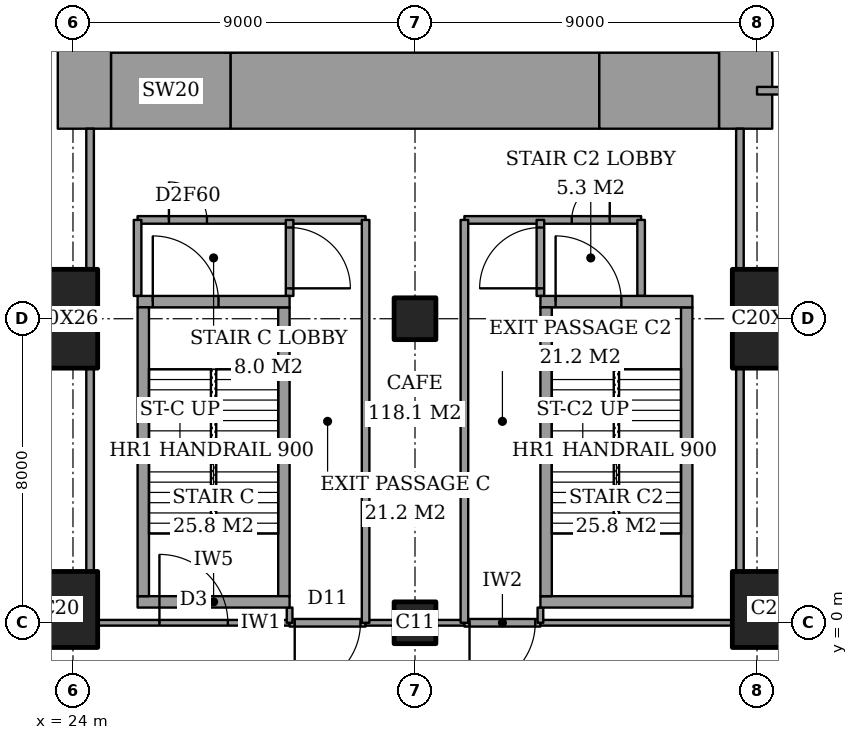
"""IFC4 building model, lengths in metres.
Left out: names, types, materials, properties, quantities, classifications, styles, units other than length and angle.
Written with IfcOpenShell. Run it as: python <this file> out.ifc"""

import sys

from ifc_helpers import new_model, si_unit, direction, frame, frame_2d, origin, origin_2d, place, context, subcontext, project, spatial, rectangle, extrude, element, fill, save


model = new_model("IFC4")
c1 = context("Model", 3, precision=1e-05, world=origin(), true_north=direction((0.0, 1.0)))
c2 = subcontext(c1, "Body", "Model", "MODEL_VIEW")
j1 = project(units=[si_unit("LENGTHUNIT", "METRE"), si_unit("PLANEANGLEUNIT", "RADIAN")], contexts=[c1])
p1 = place(None, origin())
s1 = spatial("IfcSite", under=j1, at=p1, CompositionType="ELEMENT")
p2 = place(p1, origin())
s2 = spatial("IfcBuilding", under=s1, at=p2, CompositionType="ELEMENT")
p3 = place(p2, origin())
s3 = spatial("IfcBuildingStorey", under=s2, at=p3, CompositionType="ELEMENT", Elevation=0.0)
p4 = place(p3, frame((23.65, 0.35, 0.0), z_axis=(0.0, 0.0, 1.0), x_axis=(1.0, 0.0, 0.0)))
e1 = element("IfcColumn", 1, at=p4, inside=s3, PredefinedType="COLUMN", context=c2, shape_type="SweptSolid", body=[
    extrude(rectangle(XDim=2.0, YDim=2.0, at=origin_2d()), origin(), (0.0, 0.0, 1.0), 6.0),
])
p5 = place(p3, frame((23.65, 8.0, 0.0), z_axis=(0.0, 0.0, 1.0), x_axis=(1.0, 0.0, 0.0)))
e2 = element("IfcColumn", 2, at=p5, inside=s3, PredefinedType="COLUMN", context=c2, shape_type="SweptSolid", body=[
    extrude(rectangle(XDim=2.0, YDim=2.6, at=origin_2d()), origin(), (0.0, 0.0, 1.0), 6.0),
])
for number, where, z_axis, x_axis in (
    (3, (33.0, 0.0, 0.0), (0.0, 0.0, 1.0), (1.0, 0.0, 0.0)),
    (4, (33.0, 8.0, 0.0), (0.0, 0.0, 1.0), (1.0, 0.0, 0.0)),
):
    element("IfcColumn", number, at=place(p3, frame(where, z_axis=z_axis, x_axis=x_axis)), inside=s3, PredefinedType="COLUMN", context=c2, shape_type="SweptSolid", body=[
        extrude(rectangle(XDim=1.1, YDim=1.1, at=origin_2d()), origin(), (0.0, 0.0, 1.0), 6.0),
    ])
p6 = place(p3, frame((42.35, 0.35, 0.0), z_axis=(0.0, 0.0, 1.0), x_axis=(1.0, 0.0, 0.0)))
e5 = element("IfcColumn", 5, at=p6, inside=s3, PredefinedType="COLUMN", context=c2, shape_type="SweptSolid", body=[
    extrude(rectangle(XDim=2.0, YDim=2.0, at=origin_2d()), origin(), (0.0, 0.0, 1.0), 6.0),
])
p7 = place(p3, frame((42.35, 8.0, 0.0), z_axis=(0.0, 0.0, 1.0), x_axis=(1.0, 0.0, 0.0)))
e6 = element("IfcColumn", 6, at=p7, inside=s3, PredefinedType="COLUMN", context=c2, shape_type="SweptSolid", body=[
    extrude(rectangle(XDim=2.0, YDim=2.6, at=origin_2d()), origin(), (0.0, 0.0, 1.0), 6.0),
])
p8 = place(p3, frame((25.0, 14.0, 0.0), z_axis=(0.0, 0.0, 1.0), x_axis=(1.0, 0.0, 0.0)))
e7 = element("IfcWall", 7, at=p8, inside=s3, PredefinedType="SHEAR", context=c2, shape_type="SweptSolid", body=[
    extrude(rectangle(XDim=3.15, YDim=2.0, at=frame_2d((1.575, 0.0))), origin(), (0.0, 0.0, 1.0), 6.0),
])
p9 = place(p3, frame((28.15, 14.0, 0.0), z_axis=(0.0, 0.0, 1.0), x_axis=(1.0, 0.0, 0.0)))
e8 = element("IfcWall", 8, at=p9, inside=s3, PredefinedType="SHEAR", context=c2, shape_type="SweptSolid", body=[
    extrude(rectangle(XDim=9.7, YDim=2.0, at=frame_2d((4.85, 0.0))), origin(), (0.0, 0.0, 1.0), 6.0),
])
p10 = place(p3, frame((37.85, 14.0, 0.0), z_axis=(0.0, 0.0, 1.0), x_axis=(1.0, 0.0, 0.0)))
e9 = element("IfcWall", 9, at=p10, inside=s3, PredefinedType="SHEAR", context=c2, shape_type="SweptSolid", body=[
    extrude(rectangle(XDim=3.15, YDim=2.0, at=frame_2d((1.575, 0.0))), origin(), (0.0, 0.0, 1.0), 6.0),
])
p11 = place(p3, frame((24.3, 13.0, 0.0), z_axis=(0.0, 0.0, 1.0), x_axis=(0.0, 1.0, 0.0)))
e10 = element("IfcWall", 10, at=p11, inside=s3, PredefinedType="SHEAR", context=c2, shape_type="SweptSolid", body=[
    extrude(rectangle(XDim=10.15, YDim=1.4, at=frame_2d((5.075, 0.0))), origin(), (0.0, 0.0, 1.0), 6.0),
])
p12 = place(p3, frame((41.7, 13.0, 0.0), z_axis=(0.0, 0.0, 1.0), x_axis=(0.0, 1.0, 0.0)))
e11 = element("IfcWall", 11, at=p12, inside=s3, PredefinedType="SHEAR", context=c2, shape_type="SweptSolid", body=[
    extrude(rectangle(XDim=11.85, YDim=1.4, at=frame_2d((5.925, 0.0))), origin(), (0.0, 0.0, 1.0), 6.0),
])
p13 = place(p12, frame((7.5, 0.0, 0.0)))
e12 = element("IfcOpeningElement", 12, at=p13, cuts=e11, PredefinedType="OPENING", context=c2, shape_type="SweptSolid", body=[
    extrude(rectangle(XDim=1.8, YDim=2.4, at=frame_2d((0.9, 1.2))), frame((0.0, 0.71, 0.0), z_axis=(0.0, -1.0, 0.0), x_axis=(1.0, 0.0, 0.0)), (0.0, 0.0, 1.0), 1.42),
])
p14 = place(p3, frame((29.7, 0.0, 0.0), z_axis=(0.0, 0.0, 1.0), x_axis=(1.0, 0.0, 0.0)))
e13 = element("IfcWall", 13, at=p14, inside=s3, PredefinedType="PARTITIONING", context=c2, shape_type="SweptSolid", body=[
    extrude(rectangle(XDim=2.0, YDim=0.2, at=frame_2d((1.0, 0.0))), origin(), (0.0, 0.0, 1.0), 5.7),
])
p15 = place(p14, frame((1.865, 0.0, 0.0), z_axis=(0.0, 0.0, 1.0), x_axis=(-1.0, 0.0, 0.0)))
e14 = element("IfcOpeningElement", 14, at=p15, cuts=e13, PredefinedType="OPENING", context=c2, shape_type="SweptSolid", body=[
    extrude(rectangle(XDim=1.73, YDim=2.1, at=frame_2d((0.865, 1.05))), frame((0.0, 0.11, 0.0), z_axis=(0.0, -1.0, 0.0), x_axis=(1.0, 0.0, 0.0)), (0.0, 0.0, 1.0), 0.22),
])
p16 = place(p3, frame((34.3, 0.0, 0.0), z_axis=(0.0, 0.0, 1.0), x_axis=(1.0, 0.0, 0.0)))
e15 = element("IfcWall", 15, at=p16, inside=s3, PredefinedType="PARTITIONING", context=c2, shape_type="SweptSolid", body=[
    extrude(rectangle(XDim=2.0, YDim=0.2, at=frame_2d((1.0, 0.0))), origin(), (0.0, 0.0, 1.0), 5.7),
])
p17 = place(p16, frame((1.865, 0.0, 0.0), z_axis=(0.0, 0.0, 1.0), x_axis=(-1.0, 0.0, 0.0)))
e16 = element("IfcOpeningElement", 16, at=p17, cuts=e15, PredefinedType="OPENING", context=c2, shape_type="SweptSolid", body=[
    extrude(rectangle(XDim=1.73, YDim=2.1, at=frame_2d((0.865, 1.05))), frame((0.0, 0.11, 0.0), z_axis=(0.0, -1.0, 0.0), x_axis=(1.0, 0.0, 0.0)), (0.0, 0.0, 1.0), 0.22),
])
p18 = place(p3, frame((24.65, 0.0, 0.0), z_axis=(0.0, 0.0, 1.0), x_axis=(1.0, 0.0, 0.0)))
e17 = element("IfcWall", 17, at=p18, inside=s3, PredefinedType="PARTITIONING", context=c2, shape_type="SweptSolid", body=[
    extrude(rectangle(XDim=5.05, YDim=0.15, at=frame_2d((2.525, 0.0))), origin(), (0.0, 0.0, 1.0), 5.7),
])
p19 = place(p18, frame((1.625, 0.0, 0.0)))
e18 = element("IfcOpeningElement", 18, at=p19, cuts=e17, PredefinedType="OPENING", context=c2, shape_type="SweptSolid", body=[
    extrude(rectangle(XDim=1.8, YDim=2.1, at=frame_2d((0.9, 1.05))), frame((0.0, 0.085, 0.0), z_axis=(0.0, -1.0, 0.0), x_axis=(1.0, 0.0, 0.0)), (0.0, 0.0, 1.0), 0.17),
])
for number, where, z_axis, x_axis in (
    (19, (31.7, 0.0, 0.0), (0.0, 0.0, 1.0), (1.0, 0.0, 0.0)),
    (20, (33.55, 0.0, 0.0), (0.0, 0.0, 1.0), (1.0, 0.0, 0.0)),
):
    element("IfcWall", number, at=place(p3, frame(where, z_axis=z_axis, x_axis=x_axis)), inside=s3, PredefinedType="PARTITIONING", context=c2, shape_type="SweptSolid", body=[
        extrude(rectangle(XDim=0.75, YDim=0.15, at=frame_2d((0.375, 0.0))), origin(), (0.0, 0.0, 1.0), 5.7),
    ])
p20 = place(p3, frame((36.3, 0.0, 0.0), z_axis=(0.0, 0.0, 1.0), x_axis=(1.0, 0.0, 0.0)))
e21 = element("IfcWall", 21, at=p20, inside=s3, PredefinedType="PARTITIONING", context=c2, shape_type="SweptSolid", body=[
    extrude(rectangle(XDim=5.05, YDim=0.15, at=frame_2d((2.525, 0.0))), origin(), (0.0, 0.0, 1.0), 5.7),
])
p21 = place(p3, frame((25.7, 10.6, 0.0), z_axis=(0.0, 0.0, 1.0), x_axis=(1.0, 0.0, 0.0)))
e22 = element("IfcWall", 22, at=p21, inside=s3, PredefinedType="PARTITIONING", context=c2, shape_type="SweptSolid", body=[
    extrude(rectangle(XDim=6.0, YDim=0.2, at=frame_2d((3.0, 0.0))), origin(), (0.0, 0.0, 1.0), 5.7),
])
p22 = place(p21, frame((0.825, 0.0, 0.0)))
e23 = element("IfcOpeningElement", 23, at=p22, cuts=e22, PredefinedType="OPENING", context=c2, shape_type="SweptSolid", body=[
    extrude(rectangle(XDim=1.0, YDim=2.1, at=frame_2d((0.5, 1.05))), frame((0.0, 0.11, 0.0), z_axis=(0.0, -1.0, 0.0), x_axis=(1.0, 0.0, 0.0)), (0.0, 0.0, 1.0), 0.22),
])
p23 = place(p3, frame((34.3, 10.6, 0.0), z_axis=(0.0, 0.0, 1.0), x_axis=(1.0, 0.0, 0.0)))
e24 = element("IfcWall", 24, at=p23, inside=s3, PredefinedType="PARTITIONING", context=c2, shape_type="SweptSolid", body=[
    extrude(rectangle(XDim=4.65, YDim=0.2, at=frame_2d((2.325, 0.0))), origin(), (0.0, 0.0, 1.0), 5.7),
])
p24 = place(p23, frame((2.825, 0.0, 0.0)))
e25 = element("IfcOpeningElement", 25, at=p24, cuts=e24, PredefinedType="OPENING", context=c2, shape_type="SweptSolid", body=[
    extrude(rectangle(XDim=1.0, YDim=2.1, at=frame_2d((0.5, 1.05))), frame((0.0, 0.11, 0.0), z_axis=(0.0, -1.0, 0.0), x_axis=(1.0, 0.0, 0.0)), (0.0, 0.0, 1.0), 0.22),
])
p25 = place(p3, frame((42.0, 14.0, 0.0), z_axis=(0.0, 0.0, 1.0), x_axis=(1.0, 0.0, 0.0)))
e26 = element("IfcWall", 26, at=p25, inside=s3, PredefinedType="PARTITIONING", context=c2, shape_type="SweptSolid", body=[
    extrude(rectangle(XDim=5.1, YDim=0.2, at=frame_2d((2.55, 0.0))), origin(), (0.0, 0.0, 1.0), 5.7),
])
p26 = place(p3, frame((24.45, 1.35, 0.0), z_axis=(0.0, 0.0, 1.0), x_axis=(0.0, 1.0, 0.0)))
e27 = element("IfcWall", 27, at=p26, inside=s3, PredefinedType="PARTITIONING", context=c2, shape_type="SweptSolid", body=[
    extrude(rectangle(XDim=5.35, YDim=0.2, at=frame_2d((2.675, 0.0))), origin(), (0.0, 0.0, 1.0), 5.7),
])
p27 = place(p3, frame((24.45, 9.3, 0.0), z_axis=(0.0, 0.0, 1.0), x_axis=(0.0, 1.0, 0.0)))
e28 = element("IfcWall", 28, at=p27, inside=s3, PredefinedType="PARTITIONING", context=c2, shape_type="SweptSolid", body=[
    extrude(rectangle(XDim=3.7, YDim=0.2, at=frame_2d((1.85, 0.0))), origin(), (0.0, 0.0, 1.0), 5.7),
])
p28 = place(p3, frame((25.7, 8.6, 0.0), z_axis=(0.0, 0.0, 1.0), x_axis=(0.0, 1.0, 0.0)))
e29 = element("IfcWall", 29, at=p28, inside=s3, PredefinedType="PARTITIONING", context=c2, shape_type="SweptSolid", body=[
    extrude(rectangle(XDim=2.0, YDim=0.2, at=frame_2d((1.0, 0.0))), origin(), (0.0, 0.0, 1.0), 5.7),
])
p29 = place(p3, frame((29.7, 8.6, 0.0), z_axis=(0.0, 0.0, 1.0), x_axis=(0.0, 1.0, 0.0)))
e30 = element("IfcWall", 30, at=p29, inside=s3, PredefinedType="PARTITIONING", context=c2, shape_type="SweptSolid", body=[
    extrude(rectangle(XDim=2.0, YDim=0.2, at=frame_2d((1.0, 0.0))), origin(), (0.0, 0.0, 1.0), 5.7),
])
p30 = place(p29, frame((1.8, 0.0, 0.0), z_axis=(0.0, 0.0, 1.0), x_axis=(-1.0, 0.0, 0.0)))
e31 = element("IfcOpeningElement", 31, at=p30, cuts=e30, PredefinedType="OPENING", context=c2, shape_type="SweptSolid", body=[
    extrude(rectangle(XDim=1.6, YDim=2.1, at=frame_2d((0.8, 1.05))), frame((0.0, 0.11, 0.0), z_axis=(0.0, -1.0, 0.0), x_axis=(1.0, 0.0, 0.0)), (0.0, 0.0, 1.0), 0.22),
])
p31 = place(p3, frame((29.7, 0.0, 0.0), z_axis=(0.0, 0.0, 1.0), x_axis=(0.0, 1.0, 0.0)))
e32 = element("IfcWall", 32, at=p31, inside=s3, PredefinedType="PARTITIONING", context=c2, shape_type="SweptSolid", body=[
    extrude(rectangle(XDim=0.4, YDim=0.15, at=frame_2d((0.2, 0.0))), origin(), (0.0, 0.0, 1.0), 5.7),
])
for number, where, z_axis, x_axis in (
    (33, (31.7, 0.0, 0.0), (0.0, 0.0, 1.0), (0.0, 1.0, 0.0)),
    (34, (34.3, 0.0, 0.0), (0.0, 0.0, 1.0), (0.0, 1.0, 0.0)),
):
    element("IfcWall", number, at=place(p3, frame(where, z_axis=z_axis, x_axis=x_axis)), inside=s3, PredefinedType="PARTITIONING", context=c2, shape_type="SweptSolid", body=[
        extrude(rectangle(XDim=10.6, YDim=0.2, at=frame_2d((5.3, 0.0))), origin(), (0.0, 0.0, 1.0), 5.7),
    ])
p32 = place(p3, frame((36.3, 8.6, 0.0), z_axis=(0.0, 0.0, 1.0), x_axis=(0.0, 1.0, 0.0)))
e35 = element("IfcWall", 35, at=p32, inside=s3, PredefinedType="PARTITIONING", context=c2, shape_type="SweptSolid", body=[
    extrude(rectangle(XDim=2.0, YDim=0.2, at=frame_2d((1.0, 0.0))), origin(), (0.0, 0.0, 1.0), 5.7),
])
p33 = place(p32, frame((0.2, 0.0, 0.0)))
e36 = element("IfcOpeningElement", 36, at=p33, cuts=e35, PredefinedType="OPENING", context=c2, shape_type="SweptSolid", body=[
    extrude(rectangle(XDim=1.6, YDim=2.1, at=frame_2d((0.8, 1.05))), frame((0.0, 0.11, 0.0), z_axis=(0.0, -1.0, 0.0), x_axis=(1.0, 0.0, 0.0)), (0.0, 0.0, 1.0), 0.22),
])
p34 = place(p3, frame((36.3, 0.0, 0.0), z_axis=(0.0, 0.0, 1.0), x_axis=(0.0, 1.0, 0.0)))
e37 = element("IfcWall", 37, at=p34, inside=s3, PredefinedType="PARTITIONING", context=c2, shape_type="SweptSolid", body=[
    extrude(rectangle(XDim=0.4, YDim=0.15, at=frame_2d((0.2, 0.0))), origin(), (0.0, 0.0, 1.0), 5.7),
])
p35 = place(p3, frame((38.95, 8.6, 0.0), z_axis=(0.0, 0.0, 1.0), x_axis=(0.0, 1.0, 0.0)))
e38 = element("IfcWall", 38, at=p35, inside=s3, PredefinedType="PARTITIONING", context=c2, shape_type="SweptSolid", body=[
    extrude(rectangle(XDim=2.0, YDim=0.2, at=frame_2d((1.0, 0.0))), origin(), (0.0, 0.0, 1.0), 5.7),
])
p36 = place(p3, frame((41.55, 1.35, 0.0), z_axis=(0.0, 0.0, 1.0), x_axis=(0.0, 1.0, 0.0)))
e39 = element("IfcWall", 39, at=p36, inside=s3, PredefinedType="PARTITIONING", context=c2, shape_type="SweptSolid", body=[
    extrude(rectangle(XDim=5.35, YDim=0.2, at=frame_2d((2.675, 0.0))), origin(), (0.0, 0.0, 1.0), 5.7),
])
p37 = place(p3, frame((41.55, 9.3, 0.0), z_axis=(0.0, 0.0, 1.0), x_axis=(0.0, 1.0, 0.0)))
e40 = element("IfcWall", 40, at=p37, inside=s3, PredefinedType="PARTITIONING", context=c2, shape_type="SweptSolid", body=[
    extrude(rectangle(XDim=3.7, YDim=0.2, at=frame_2d((1.85, 0.0))), origin(), (0.0, 0.0, 1.0), 5.7),
])
for number, where, z_axis, x_axis in (
    (41, (31.4, 15.0, 0.0), (0.0, 0.0, 1.0), (0.0, 1.0, 0.0)),
    (42, (34.6, 15.0, 0.0), (0.0, 0.0, 1.0), (0.0, 1.0, 0.0)),
):
    element("IfcWall", number, at=place(p3, frame(where, z_axis=z_axis, x_axis=x_axis)), inside=s3, PredefinedType="PARTITIONING", context=c2, shape_type="SweptSolid", body=[
        extrude(rectangle(XDim=2.8, YDim=0.2, at=frame_2d((1.4, 0.0))), origin(), (0.0, 0.0, 1.0), 6.0),
    ])
p38 = place(p3, frame((37.85, 15.0, 0.0), z_axis=(0.0, 0.0, 1.0), x_axis=(0.0, 1.0, 0.0)))
e43 = element("IfcWall", 43, at=p38, inside=s3, PredefinedType="SHEAR", context=c2, shape_type="SweptSolid", body=[
    extrude(rectangle(XDim=2.8, YDim=0.3, at=frame_2d((1.4, 0.0))), origin(), (0.0, 0.0, 1.0), 6.0),
])
p39 = place(p3, frame((25.7, 0.55, 0.0), z_axis=(0.0, 0.0, 1.0), x_axis=(1.0, 0.0, 0.0)))
e44 = element("IfcWall", 44, at=p39, inside=s3, PredefinedType="PARTITIONING", context=c2, shape_type="SweptSolid", body=[
    extrude(rectangle(XDim=4.0, YDim=0.3, at=frame_2d((2.0, 0.0))), origin(), (0.0, 0.0, 1.0), 6.0),
])
p40 = place(p3, frame((25.7, 8.45, 0.0), z_axis=(0.0, 0.0, 1.0), x_axis=(1.0, 0.0, 0.0)))
e45 = element("IfcWall", 45, at=p40, inside=s3, PredefinedType="PARTITIONING", context=c2, shape_type="SweptSolid", body=[
    extrude(rectangle(XDim=4.0, YDim=0.3, at=frame_2d((2.0, 0.0))), origin(), (0.0, 0.0, 1.0), 6.0),
])
p41 = place(p40, frame((0.4, 0.0, 0.0)))
e46 = element("IfcOpeningElement", 46, at=p41, cuts=e45, PredefinedType="OPENING", context=c2, shape_type="SweptSolid", body=[
    extrude(rectangle(XDim=1.73, YDim=2.1, at=frame_2d((0.865, 1.05))), frame((0.0, 0.16, 0.0), z_axis=(0.0, -1.0, 0.0), x_axis=(1.0, 0.0, 0.0)), (0.0, 0.0, 1.0), 0.32),
])
for number, where, z_axis, x_axis in (
    (47, (25.85, 0.7, 0.0), (0.0, 0.0, 1.0), (0.0, 1.0, 0.0)),
    (48, (29.55, 0.7, 0.0), (0.0, 0.0, 1.0), (0.0, 1.0, 0.0)),
):
    element("IfcWall", number, at=place(p3, frame(where, z_axis=z_axis, x_axis=x_axis)), inside=s3, PredefinedType="PARTITIONING", context=c2, shape_type="SweptSolid", body=[
        extrude(rectangle(XDim=7.6, YDim=0.3, at=frame_2d((3.8, 0.0))), origin(), (0.0, 0.0, 1.0), 6.0),
    ])
p42 = place(p3, frame((36.3, 0.55, 0.0), z_axis=(0.0, 0.0, 1.0), x_axis=(1.0, 0.0, 0.0)))
e49 = element("IfcWall", 49, at=p42, inside=s3, PredefinedType="PARTITIONING", context=c2, shape_type="SweptSolid", body=[
    extrude(rectangle(XDim=4.0, YDim=0.3, at=frame_2d((2.0, 0.0))), origin(), (0.0, 0.0, 1.0), 6.0),
])
p43 = place(p3, frame((36.3, 8.45, 0.0), z_axis=(0.0, 0.0, 1.0), x_axis=(1.0, 0.0, 0.0)))
e50 = element("IfcWall", 50, at=p43, inside=s3, PredefinedType="PARTITIONING", context=c2, shape_type="SweptSolid", body=[
    extrude(rectangle(XDim=4.0, YDim=0.3, at=frame_2d((2.0, 0.0))), origin(), (0.0, 0.0, 1.0), 6.0),
])
p44 = place(p43, frame((0.4, 0.0, 0.0)))
e51 = element("IfcOpeningElement", 51, at=p44, cuts=e50, PredefinedType="OPENING", context=c2, shape_type="SweptSolid", body=[
    extrude(rectangle(XDim=1.73, YDim=2.1, at=frame_2d((0.865, 1.05))), frame((0.0, 0.16, 0.0), z_axis=(0.0, -1.0, 0.0), x_axis=(1.0, 0.0, 0.0)), (0.0, 0.0, 1.0), 0.32),
])
for number, where, z_axis, x_axis in (
    (52, (36.45, 0.7, 0.0), (0.0, 0.0, 1.0), (0.0, 1.0, 0.0)),
    (53, (40.15, 0.7, 0.0), (0.0, 0.0, 1.0), (0.0, 1.0, 0.0)),
):
    element("IfcWall", number, at=place(p3, frame(where, z_axis=z_axis, x_axis=x_axis)), inside=s3, PredefinedType="PARTITIONING", context=c2, shape_type="SweptSolid", body=[
        extrude(rectangle(XDim=7.6, YDim=0.3, at=frame_2d((3.8, 0.0))), origin(), (0.0, 0.0, 1.0), 6.0),
    ])
p45 = place(p19, origin())
e54 = element("IfcDoor", 54, at=p45, inside=s3, OperationType="DOUBLE_DOOR_DOUBLE_SWING", PredefinedType="DOOR", context=c2, shape_type="SweptSolid", body=[
    extrude(rectangle(XDim=1.8, YDim=2.1, at=frame_2d((0.9, 1.05))), frame((0.0, 0.025, 0.0), z_axis=(0.0, -1.0, 0.0), x_axis=(1.0, 0.0, 0.0)), (0.0, 0.0, 1.0), 0.05),
])
fill(e18, e54)
p46 = place(p22, origin())
e55 = element("IfcDoor", 55, at=p46, inside=s3, OperationType="SINGLE_SWING_RIGHT", PredefinedType="DOOR", context=c2, shape_type="SweptSolid", body=[
    extrude(rectangle(XDim=1.0, YDim=2.1, at=frame_2d((0.5, 1.05))), frame((0.0, 0.025, 0.0), z_axis=(0.0, -1.0, 0.0), x_axis=(1.0, 0.0, 0.0)), (0.0, 0.0, 1.0), 0.05),
])
fill(e23, e55)
p47 = place(p24, origin())
e56 = element("IfcDoor", 56, at=p47, inside=s3, OperationType="SINGLE_SWING_LEFT", PredefinedType="DOOR", context=c2, shape_type="SweptSolid", body=[
    extrude(rectangle(XDim=1.0, YDim=2.1, at=frame_2d((0.5, 1.05))), frame((0.0, 0.025, 0.0), z_axis=(0.0, -1.0, 0.0), x_axis=(1.0, 0.0, 0.0)), (0.0, 0.0, 1.0), 0.05),
])
fill(e25, e56)
p48 = place(p30, origin())
e57 = element("IfcDoor", 57, at=p48, inside=s3, OperationType="DOUBLE_DOOR_SINGLE_SWING", PredefinedType="DOOR", context=c2, shape_type="SweptSolid", body=[
    extrude(rectangle(XDim=1.6, YDim=2.1, at=frame_2d((0.8, 1.05))), frame((0.0, 0.025, 0.0), z_axis=(0.0, -1.0, 0.0), x_axis=(1.0, 0.0, 0.0)), (0.0, 0.0, 1.0), 0.05),
])
fill(e31, e57)
p49 = place(p15, origin())
e58 = element("IfcDoor", 58, at=p49, inside=s3, OperationType="DOUBLE_DOOR_SINGLE_SWING", PredefinedType="DOOR", context=c2, shape_type="SweptSolid", body=[
    extrude(rectangle(XDim=1.73, YDim=2.1, at=frame_2d((0.865, 1.05))), frame((0.0, 0.025, 0.0), z_axis=(0.0, -1.0, 0.0), x_axis=(1.0, 0.0, 0.0)), (0.0, 0.0, 1.0), 0.05),
])
fill(e14, e58)
p50 = place(p33, origin())
e59 = element("IfcDoor", 59, at=p50, inside=s3, OperationType="DOUBLE_DOOR_SINGLE_SWING", PredefinedType="DOOR", context=c2, shape_type="SweptSolid", body=[
    extrude(rectangle(XDim=1.6, YDim=2.1, at=frame_2d((0.8, 1.05))), frame((0.0, 0.025, 0.0), z_axis=(0.0, -1.0, 0.0), x_axis=(1.0, 0.0, 0.0)), (0.0, 0.0, 1.0), 0.05),
])
fill(e36, e59)
p51 = place(p17, origin())
e60 = element("IfcDoor", 60, at=p51, inside=s3, OperationType="DOUBLE_DOOR_SINGLE_SWING", PredefinedType="DOOR", context=c2, shape_type="SweptSolid", body=[
    extrude(rectangle(XDim=1.73, YDim=2.1, at=frame_2d((0.865, 1.05))), frame((0.0, 0.025, 0.0), z_axis=(0.0, -1.0, 0.0), x_axis=(1.0, 0.0, 0.0)), (0.0, 0.0, 1.0), 0.05),
])
fill(e16, e60)
p52 = place(p41, origin())
e61 = element("IfcDoor", 61, at=p52, inside=s3, OperationType="DOUBLE_DOOR_SINGLE_SWING", PredefinedType="DOOR", context=c2, shape_type="SweptSolid", body=[
    extrude(rectangle(XDim=1.73, YDim=2.1, at=frame_2d((0.865, 1.05))), frame((0.0, 0.025, 0.0), z_axis=(0.0, -1.0, 0.0), x_axis=(1.0, 0.0, 0.0)), (0.0, 0.0, 1.0), 0.05),
])
fill(e46, e61)
p53 = place(p44, origin())
e62 = element("IfcDoor", 62, at=p53, inside=s3, OperationType="DOUBLE_DOOR_SINGLE_SWING", PredefinedType="DOOR", context=c2, shape_type="SweptSolid", body=[
    extrude(rectangle(XDim=1.73, YDim=2.1, at=frame_2d((0.865, 1.05))), frame((0.0, 0.025, 0.0), z_axis=(0.0, -1.0, 0.0), x_axis=(1.0, 0.0, 0.0)), (0.0, 0.0, 1.0), 0.05),
])
fill(e51, e62)
save(model, sys.argv[1])
